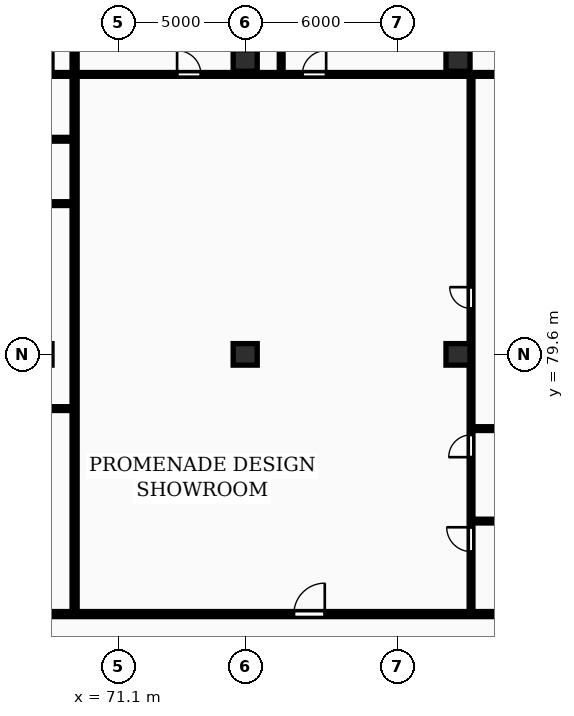
"""IFC4 building model, lengths in metres.
Left out: names, types, materials, properties, quantities, classifications, styles, units other than length and angle.
Written with IfcOpenShell. Run it as: python <this file> out.ifc"""

import sys

from ifc_helpers import new_model, si_unit, direction, frame, frame_2d, origin, origin_2d, place, context, subcontext, project, spatial, rectangle, extrude, element, fill, save


model = new_model("IFC4")
c1 = context("Model", 3, precision=1e-05, world=origin(), true_north=direction((0.0, 1.0)))
c2 = subcontext(c1, "Body", "Model", "MODEL_VIEW")
j1 = project(units=[si_unit("LENGTHUNIT", "METRE"), si_unit("PLANEANGLEUNIT", "RADIAN")], contexts=[c1])
p1 = place(None, origin())
s1 = spatial("IfcSite", under=j1, at=p1, CompositionType="ELEMENT")
p2 = place(p1, origin())
s2 = spatial("IfcBuilding", under=s1, at=p2, CompositionType="ELEMENT")
p3 = place(p2, frame((0.0, 0.0, 87.3)))
s3 = spatial("IfcBuildingStorey", under=s2, at=p3, CompositionType="ELEMENT", Elevation=87.3)
for number, where, z_axis, x_axis in (
    (1, (76.1, 79.6, 0.0), (0.0, 0.0, 1.0), (1.0, 0.0, 0.0)),
    (2, (76.1, 91.2, 0.0), (0.0, 0.0, 1.0), (1.0, 0.0, 0.0)),
    (3, (84.5, 79.6, 0.0), (0.0, 0.0, 1.0), (1.0, 0.0, 0.0)),
    (4, (84.5, 91.2, 0.0), (0.0, 0.0, 1.0), (1.0, 0.0, 0.0)),
):
    element("IfcColumn", number, at=place(p3, frame(where, z_axis=z_axis, x_axis=x_axis)), inside=s3, PredefinedType="COLUMN", context=c2, shape_type="SweptSolid", body=[
        extrude(rectangle(XDim=0.95, YDim=0.85, at=origin_2d()), origin(), (0.0, 0.0, 1.0), 3.25),
    ])
p4 = place(p3, frame((69.367, 69.43, 0.0), z_axis=(0.0, 0.0, 1.0), x_axis=(0.0, 1.0, 0.0)))
e5 = element("IfcWall", 5, at=p4, inside=s3, PredefinedType="PARTITIONING", context=c2, shape_type="SweptSolid", body=[
    extrude(rectangle(XDim=26.47, YDim=0.2, at=frame_2d((13.235, 0.0))), origin(), (0.0, 0.0, 1.0), 2.97),
])
p5 = place(p3, frame((61.63, 77.46, 0.0), z_axis=(0.0, 0.0, 1.0), x_axis=(1.0, 0.0, 0.0)))
e6 = element("IfcWall", 6, at=p5, inside=s3, PredefinedType="PARTITIONING", context=c2, shape_type="SweptSolid", body=[
    extrude(rectangle(XDim=7.657, YDim=0.15, at=frame_2d((3.828, 0.0))), origin(), (0.0, 0.0, 1.0), 2.97),
])
p6 = place(p5, frame((3.388, 0.0, 0.0)))
e7 = element("IfcOpeningElement", 7, at=p6, cuts=e6, PredefinedType="OPENING", context=c2, shape_type="SweptSolid", body=[
    extrude(rectangle(XDim=0.88, YDim=2.06, at=frame_2d((0.44, 1.03))), frame((0.0, 0.085, 0.0), z_axis=(0.0, -1.0, 0.0), x_axis=(1.0, 0.0, 0.0)), (0.0, 0.0, 1.0), 0.17),
])
p7 = place(p3, frame((66.007, 88.09, 0.0), z_axis=(0.0, 0.0, 1.0), x_axis=(1.0, 0.0, 0.0)))
e8 = element("IfcWall", 8, at=p7, inside=s3, PredefinedType="PARTITIONING", context=c2, shape_type="SweptSolid", body=[
    extrude(rectangle(XDim=3.28, YDim=0.15, at=frame_2d((1.64, 0.0))), origin(), (0.0, 0.0, 1.0), 2.97),
])
p8 = place(p3, frame((57.68, 85.55, 0.0), z_axis=(0.0, 0.0, 1.0), x_axis=(1.0, 0.0, 0.0)))
e9 = element("IfcWall", 9, at=p8, inside=s3, PredefinedType="PARTITIONING", context=c2, shape_type="SweptSolid", body=[
    extrude(rectangle(XDim=11.607, YDim=0.15, at=frame_2d((5.803, 0.0))), origin(), (0.0, 0.0, 1.0), 2.97),
])
p9 = place(p8, frame((2.72, 0.0, 0.0)))
e10 = element("IfcOpeningElement", 10, at=p9, cuts=e9, PredefinedType="OPENING", context=c2, shape_type="SweptSolid", body=[
    extrude(rectangle(XDim=0.92, YDim=2.08, at=frame_2d((0.46, 1.04))), frame((0.0, 0.085, 0.0), z_axis=(0.0, -1.0, 0.0), x_axis=(1.0, 0.0, 0.0)), (0.0, 0.0, 1.0), 0.17),
])
p10 = place(p3, frame((57.68, 90.65, 0.0), z_axis=(0.0, 0.0, 1.0), x_axis=(1.0, 0.0, 0.0)))
e11 = element("IfcWall", 11, at=p10, inside=s3, PredefinedType="PARTITIONING", context=c2, shape_type="SweptSolid", body=[
    extrude(rectangle(XDim=11.607, YDim=0.15, at=frame_2d((5.803, 0.0))), origin(), (0.0, 0.0, 1.0), 2.97),
])
p11 = place(p10, frame((5.333, 0.0, 0.0)))
e12 = element("IfcOpeningElement", 12, at=p11, cuts=e11, PredefinedType="OPENING", context=c2, shape_type="SweptSolid", body=[
    extrude(rectangle(XDim=0.94, YDim=2.1, at=frame_2d((0.47, 1.05))), frame((0.0, 0.085, 0.0), z_axis=(0.0, -1.0, 0.0), x_axis=(1.0, 0.0, 0.0)), (0.0, 0.0, 1.0), 0.17),
])
for number, where, z_axis, x_axis in (
    (13, (85.075, 73.02, 0.0), (0.0, 0.0, 1.0), (1.0, 0.0, 0.0)),
    (14, (85.075, 76.67, 0.0), (0.0, 0.0, 1.0), (1.0, 0.0, 0.0)),
):
    element("IfcWall", number, at=place(p3, frame(where, z_axis=z_axis, x_axis=x_axis)), inside=s3, PredefinedType="PARTITIONING", context=c2, shape_type="SweptSolid", body=[
        extrude(rectangle(XDim=3.13, YDim=0.15, at=frame_2d((1.565, 0.0))), origin(), (0.0, 0.0, 1.0), 2.97),
    ])
p12 = place(p3, frame((85.015, 69.41, 0.0), z_axis=(0.0, 0.0, 1.0), x_axis=(0.0, 1.0, 0.0)))
e15 = element("IfcWall", 15, at=p12, inside=s3, PredefinedType="PARTITIONING", context=c2, shape_type="SweptSolid", body=[
    extrude(rectangle(XDim=21.18, YDim=0.15, at=frame_2d((10.59, 0.0))), origin(), (0.0, 0.0, 1.0), 2.97),
])
p13 = place(p12, frame((2.406, 0.0, 0.0)))
e16 = element("IfcOpeningElement", 16, at=p13, cuts=e15, PredefinedType="OPENING", context=c2, shape_type="SweptSolid", body=[
    extrude(rectangle(XDim=0.96, YDim=2.1, at=frame_2d((0.48, 1.05))), frame((0.0, 0.085, 0.0), z_axis=(0.0, -1.0, 0.0), x_axis=(1.0, 0.0, 0.0)), (0.0, 0.0, 1.0), 0.17),
])
p14 = place(p12, frame((6.133, 0.0, 0.0)))
e17 = element("IfcOpeningElement", 17, at=p14, cuts=e15, PredefinedType="OPENING", context=c2, shape_type="SweptSolid", body=[
    extrude(rectangle(XDim=0.88, YDim=2.06, at=frame_2d((0.44, 1.03))), frame((0.0, 0.085, 0.0), z_axis=(0.0, -1.0, 0.0), x_axis=(1.0, 0.0, 0.0)), (0.0, 0.0, 1.0), 0.17),
])
p15 = place(p12, frame((12.003, 0.0, 0.0)))
e18 = element("IfcOpeningElement", 18, at=p15, cuts=e15, PredefinedType="OPENING", context=c2, shape_type="SweptSolid", body=[
    extrude(rectangle(XDim=0.84, YDim=2.04, at=frame_2d((0.42, 1.02))), frame((0.0, 0.085, 0.0), z_axis=(0.0, -1.0, 0.0), x_axis=(1.0, 0.0, 0.0)), (0.0, 0.0, 1.0), 0.17),
])
p16 = place(p3, frame((77.521, 90.73, 0.0), z_axis=(0.0, 0.0, 1.0), x_axis=(0.0, 1.0, 0.0)))
e19 = element("IfcWall", 19, at=p16, inside=s3, PredefinedType="PARTITIONING", context=c2, shape_type="SweptSolid", body=[
    extrude(rectangle(XDim=5.17, YDim=0.15, at=frame_2d((2.585, 0.0))), origin(), (0.0, 0.0, 1.0), 2.97),
])
p17 = place(p3, frame((69.447, 90.65, 0.0), z_axis=(0.0, 0.0, 1.0), x_axis=(1.0, 0.0, 0.0)))
e20 = element("IfcWall", 20, at=p17, inside=s3, PredefinedType="PARTITIONING", context=c2, shape_type="SweptSolid", body=[
    extrude(rectangle(XDim=18.758, YDim=0.15, at=frame_2d((9.379, 0.0))), origin(), (0.0, 0.0, 1.0), 2.97),
])
p18 = place(p17, frame((3.965, 0.0, 0.0)))
e21 = element("IfcOpeningElement", 21, at=p18, cuts=e20, PredefinedType="OPENING", context=c2, shape_type="SweptSolid", body=[
    extrude(rectangle(XDim=0.94, YDim=2.1, at=frame_2d((0.47, 1.05))), frame((0.0, 0.085, 0.0), z_axis=(0.0, -1.0, 0.0), x_axis=(1.0, 0.0, 0.0)), (0.0, 0.0, 1.0), 0.17),
])
p19 = place(p17, frame((8.909, 0.0, 0.0)))
e22 = element("IfcOpeningElement", 22, at=p19, cuts=e20, PredefinedType="OPENING", context=c2, shape_type="SweptSolid", body=[
    extrude(rectangle(XDim=0.94, YDim=2.1, at=frame_2d((0.47, 1.05))), frame((0.0, 0.085, 0.0), z_axis=(0.0, -1.0, 0.0), x_axis=(1.0, 0.0, 0.0)), (0.0, 0.0, 1.0), 0.17),
])
p20 = place(p3, frame((57.6, 69.35, 0.0), z_axis=(0.0, 0.0, 1.0), x_axis=(1.0, 0.0, 0.0)))
e23 = element("IfcWall", 23, at=p20, inside=s3, PredefinedType="PARTITIONING", context=c2, shape_type="SweptSolid", body=[
    extrude(rectangle(XDim=73.0, YDim=0.2, at=frame_2d((36.5, 0.0))), origin(), (0.0, 0.0, 1.0), 2.97),
])
p21 = place(p20, frame((0.37, 0.0, 0.0)))
e24 = element("IfcOpeningElement", 24, at=p21, cuts=e23, PredefinedType="OPENING", context=c2, shape_type="SweptSolid", body=[
    extrude(rectangle(XDim=0.95, YDim=2.15, at=frame_2d((0.475, 1.075))), frame((0.0, 0.11, 0.0), z_axis=(0.0, -1.0, 0.0), x_axis=(1.0, 0.0, 0.0)), (0.0, 0.0, 1.0), 0.22),
])
p22 = place(p20, frame((20.421, 0.0, 0.0)))
e25 = element("IfcOpeningElement", 25, at=p22, cuts=e23, PredefinedType="OPENING", context=c2, shape_type="SweptSolid", body=[
    extrude(rectangle(XDim=1.22, YDim=2.18, at=frame_2d((0.61, 1.09))), frame((0.0, 0.11, 0.0), z_axis=(0.0, -1.0, 0.0), x_axis=(1.0, 0.0, 0.0)), (0.0, 0.0, 1.0), 0.22),
])
p23 = place(p20, frame((32.729, 0.0, 0.0)))
e26 = element("IfcOpeningElement", 26, at=p23, cuts=e23, PredefinedType="OPENING", context=c2, shape_type="SweptSolid", body=[
    extrude(rectangle(XDim=0.95, YDim=2.15, at=frame_2d((0.475, 1.075))), frame((0.0, 0.11, 0.0), z_axis=(0.0, -1.0, 0.0), x_axis=(1.0, 0.0, 0.0)), (0.0, 0.0, 1.0), 0.22),
])
p24 = place(p20, frame((46.157, 0.0, 0.0)))
e27 = element("IfcOpeningElement", 27, at=p24, cuts=e23, PredefinedType="OPENING", context=c2, shape_type="SweptSolid", body=[
    extrude(rectangle(XDim=0.95, YDim=2.15, at=frame_2d((0.475, 1.075))), frame((0.0, 0.11, 0.0), z_axis=(0.0, -1.0, 0.0), x_axis=(1.0, 0.0, 0.0)), (0.0, 0.0, 1.0), 0.22),
])
p25 = place(p20, frame((60.803, 0.0, 0.0)))
e28 = element("IfcOpeningElement", 28, at=p25, cuts=e23, PredefinedType="OPENING", context=c2, shape_type="SweptSolid", body=[
    extrude(rectangle(XDim=0.95, YDim=2.15, at=frame_2d((0.475, 1.075))), frame((0.0, 0.11, 0.0), z_axis=(0.0, -1.0, 0.0), x_axis=(1.0, 0.0, 0.0)), (0.0, 0.0, 1.0), 0.22),
])
p26 = place(p13, origin())
e29 = element("IfcDoor", 29, at=p26, inside=s3, OperationType="SINGLE_SWING_RIGHT", PredefinedType="DOOR", context=c2, shape_type="SweptSolid", body=[
    extrude(rectangle(XDim=0.96, YDim=2.1, at=frame_2d((0.48, 1.05))), frame((0.0, 0.025, 0.0), z_axis=(0.0, -1.0, 0.0), x_axis=(1.0, 0.0, 0.0)), (0.0, 0.0, 1.0), 0.05),
])
fill(e16, e29)
p27 = place(p14, origin())
e30 = element("IfcDoor", 30, at=p27, inside=s3, OperationType="SINGLE_SWING_LEFT", PredefinedType="DOOR", context=c2, shape_type="SweptSolid", body=[
    extrude(rectangle(XDim=0.88, YDim=2.06, at=frame_2d((0.44, 1.03))), frame((0.0, 0.025, 0.0), z_axis=(0.0, -1.0, 0.0), x_axis=(1.0, 0.0, 0.0)), (0.0, 0.0, 1.0), 0.05),
])
fill(e17, e30)
p28 = place(p15, origin())
e31 = element("IfcDoor", 31, at=p28, inside=s3, OperationType="SINGLE_SWING_RIGHT", PredefinedType="DOOR", context=c2, shape_type="SweptSolid", body=[
    extrude(rectangle(XDim=0.84, YDim=2.04, at=frame_2d((0.42, 1.02))), frame((0.0, 0.025, 0.0), z_axis=(0.0, -1.0, 0.0), x_axis=(1.0, 0.0, 0.0)), (0.0, 0.0, 1.0), 0.05),
])
fill(e18, e31)
p29 = place(p18, origin())
e32 = element("IfcDoor", 32, at=p29, inside=s3, OperationType="SINGLE_SWING_LEFT", PredefinedType="DOOR", context=c2, shape_type="SweptSolid", body=[
    extrude(rectangle(XDim=0.94, YDim=2.1, at=frame_2d((0.47, 1.05))), frame((0.0, 0.025, 0.0), z_axis=(0.0, -1.0, 0.0), x_axis=(1.0, 0.0, 0.0)), (0.0, 0.0, 1.0), 0.05),
])
fill(e21, e32)
p30 = place(p19, origin())
e33 = element("IfcDoor", 33, at=p30, inside=s3, OperationType="SINGLE_SWING_RIGHT", PredefinedType="DOOR", context=c2, shape_type="SweptSolid", body=[
    extrude(rectangle(XDim=0.94, YDim=2.1, at=frame_2d((0.47, 1.05))), frame((0.0, 0.025, 0.0), z_axis=(0.0, -1.0, 0.0), x_axis=(1.0, 0.0, 0.0)), (0.0, 0.0, 1.0), 0.05),
])
fill(e22, e33)
p31 = place(p22, origin())
e34 = element("IfcDoor", 34, at=p31, inside=s3, OperationType="SINGLE_SWING_RIGHT", PredefinedType="DOOR", context=c2, shape_type="SweptSolid", body=[
    extrude(rectangle(XDim=1.22, YDim=2.18, at=frame_2d((0.61, 1.09))), frame((0.0, 0.025, 0.0), z_axis=(0.0, -1.0, 0.0), x_axis=(1.0, 0.0, 0.0)), (0.0, 0.0, 1.0), 0.05),
])
fill(e25, e34)
save(model, sys.argv[1])
